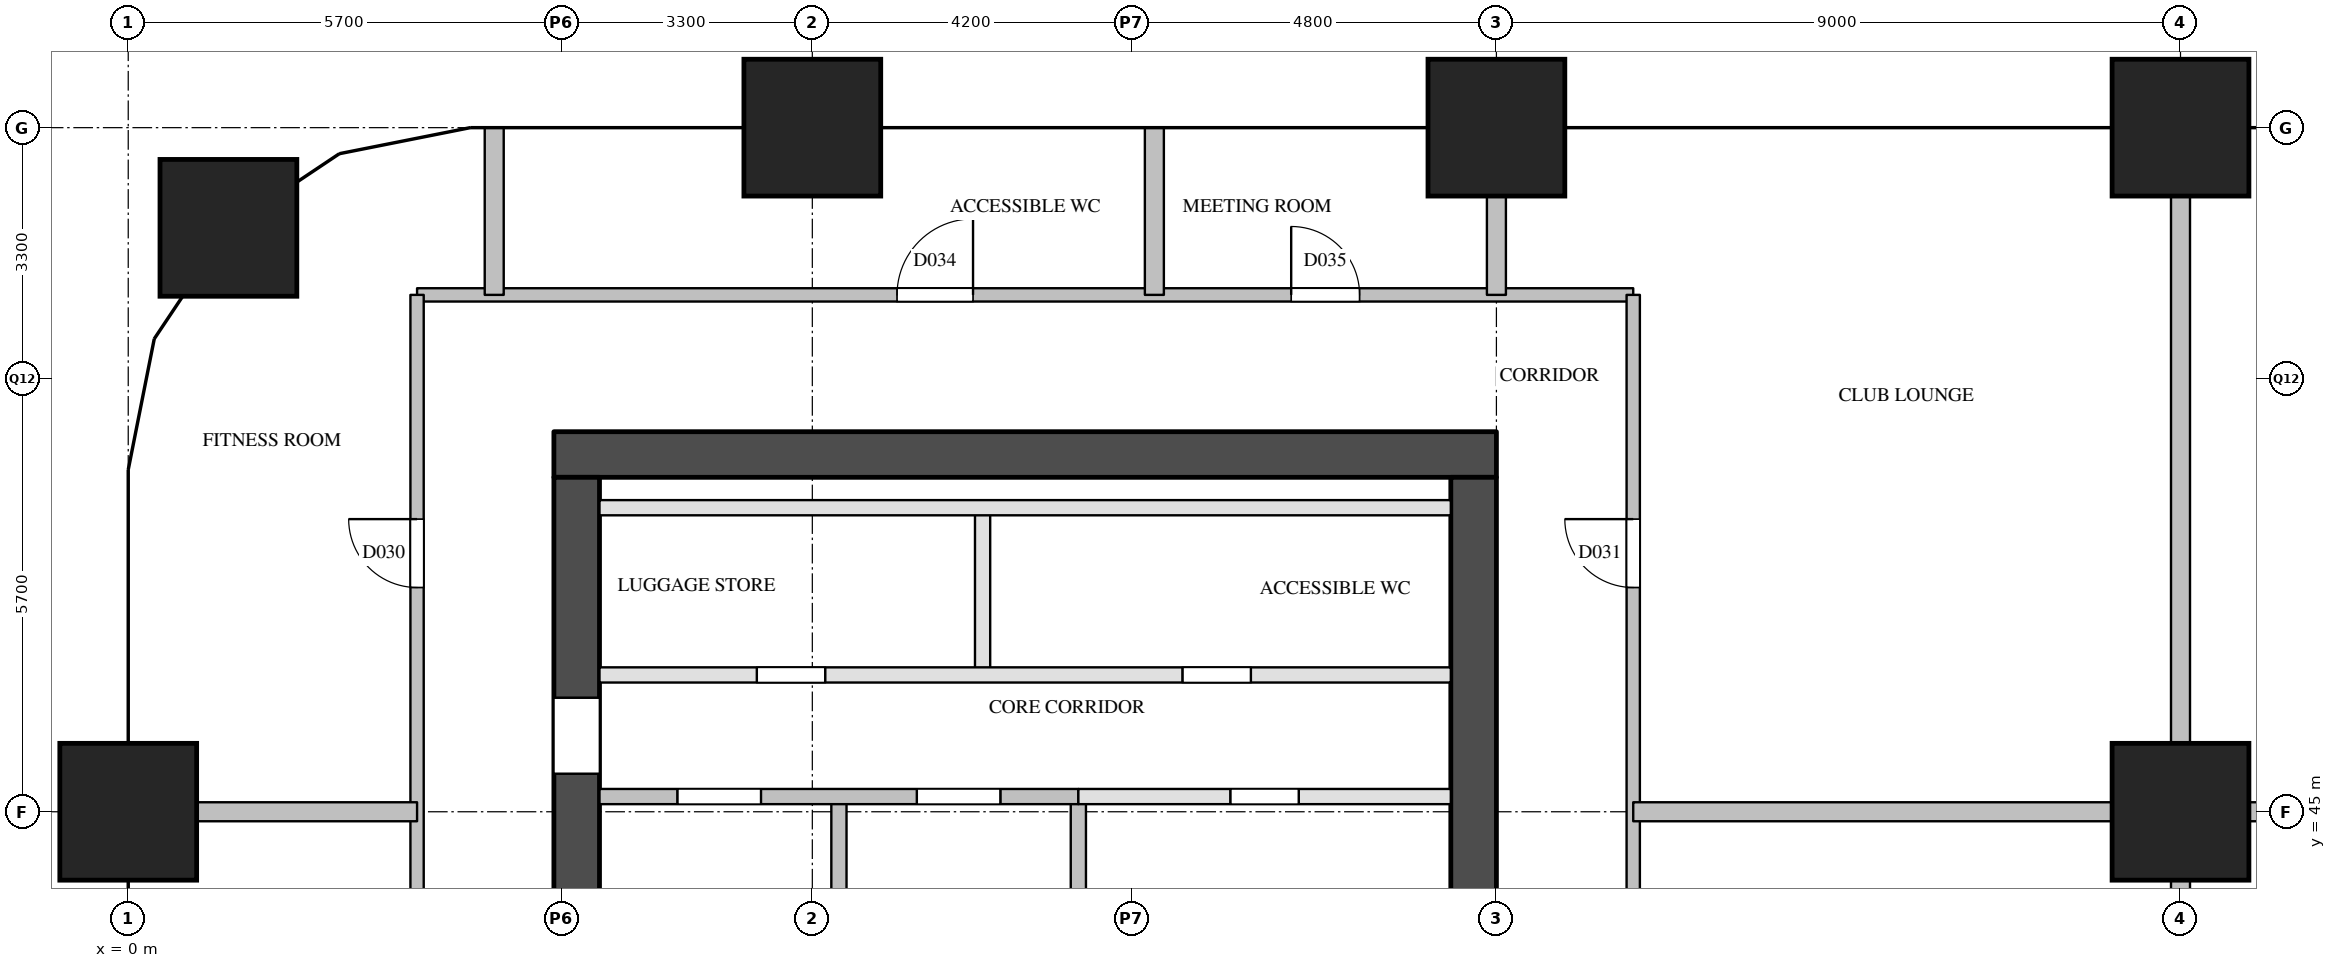
"""IFC4 building model, lengths in metres.
Left out: names, types, materials, properties, quantities, classifications, styles, units other than length and angle.
Written with IfcOpenShell. Run it as: python <this file> out.ifc"""

import sys

from ifc_helpers import new_model, si_unit, direction, frame, frame_2d, origin, origin_2d, place, context, subcontext, project, spatial, rectangle, extrude, element, fill, save


model = new_model("IFC4")
c1 = context("Model", 3, precision=1e-05, world=origin(), true_north=direction((0.0, 1.0)))
c2 = subcontext(c1, "Body", "Model", "MODEL_VIEW")
j1 = project(units=[si_unit("LENGTHUNIT", "METRE"), si_unit("PLANEANGLEUNIT", "RADIAN")], contexts=[c1])
p1 = place(None, origin())
s1 = spatial("IfcSite", under=j1, at=p1, CompositionType="ELEMENT")
p2 = place(p1, origin())
s2 = spatial("IfcBuilding", under=s1, at=p2, CompositionType="ELEMENT")
p3 = place(p2, frame((0.0, 0.0, 104.4)))
s3 = spatial("IfcBuildingStorey", under=s2, at=p3, CompositionType="ELEMENT", Elevation=104.4)
for number, where, z_axis, x_axis in (
    (1, (0.0, 45.0, 0.0), (0.0, 0.0, 1.0), (1.0, 0.0, 0.0)),
    (2, (1.318, 52.682, 0.0), (0.0, 0.0, 1.0), (1.0, 0.0, 0.0)),
    (3, (9.0, 54.0, 0.0), (0.0, 0.0, 1.0), (1.0, 0.0, 0.0)),
    (4, (18.0, 54.0, 0.0), (0.0, 0.0, 1.0), (1.0, 0.0, 0.0)),
    (5, (27.0, 45.0, 0.0), (0.0, 0.0, 1.0), (1.0, 0.0, 0.0)),
    (6, (27.0, 54.0, 0.0), (0.0, 0.0, 1.0), (1.0, 0.0, 0.0)),
):
    element("IfcColumn", number, at=place(p3, frame(where, z_axis=z_axis, x_axis=x_axis)), inside=s3, PredefinedType="COLUMN", context=c2, shape_type="SweptSolid", body=[
        extrude(rectangle(XDim=1.8, YDim=1.8, at=origin_2d()), origin(), (0.0, 0.0, 1.0), 3.8),
    ])
p4 = place(p3, frame((5.6, 49.7, 0.0), z_axis=(0.0, 0.0, 1.0), x_axis=(1.0, 0.0, 0.0)))
e7 = element("IfcWall", 7, at=p4, inside=s3, PredefinedType="SHEAR", context=c2, shape_type="SweptSolid", body=[
    extrude(rectangle(XDim=12.4, YDim=0.6, at=frame_2d((6.2, 0.0))), origin(), (0.0, 0.0, 1.0), 3.5),
])
p5 = place(p3, frame((5.9, 29.1, 0.0), z_axis=(0.0, 0.0, 1.0), x_axis=(0.0, 1.0, 0.0)))
e8 = element("IfcWall", 8, at=p5, inside=s3, PredefinedType="SHEAR", context=c2, shape_type="SweptSolid", body=[
    extrude(rectangle(XDim=20.3, YDim=0.6, at=frame_2d((10.15, 0.0))), origin(), (0.0, 0.0, 1.0), 3.5),
])
p6 = place(p5, frame((3.6, 0.0, 0.0)))
e9 = element("IfcOpeningElement", 9, at=p6, cuts=e8, PredefinedType="OPENING", context=c2, shape_type="SweptSolid", body=[
    extrude(rectangle(XDim=1.8, YDim=2.1, at=frame_2d((0.9, 1.05))), frame((0.0, 0.31, 0.0), z_axis=(0.0, -1.0, 0.0), x_axis=(1.0, 0.0, 0.0)), (0.0, 0.0, 1.0), 0.62),
])
p7 = place(p5, frame((16.4, 0.0, 0.0)))
e10 = element("IfcOpeningElement", 10, at=p7, cuts=e8, PredefinedType="OPENING", context=c2, shape_type="SweptSolid", body=[
    extrude(rectangle(XDim=1.0, YDim=2.1, at=frame_2d((0.5, 1.05))), frame((0.0, 0.31, 0.0), z_axis=(0.0, -1.0, 0.0), x_axis=(1.0, 0.0, 0.0)), (0.0, 0.0, 1.0), 0.62),
])
p8 = place(p3, frame((17.7, 29.1, 0.0), z_axis=(0.0, 0.0, 1.0), x_axis=(0.0, 1.0, 0.0)))
e11 = element("IfcWall", 11, at=p8, inside=s3, PredefinedType="SHEAR", context=c2, shape_type="SweptSolid", body=[
    extrude(rectangle(XDim=20.3, YDim=0.6, at=frame_2d((10.15, 0.0))), origin(), (0.0, 0.0, 1.0), 3.5),
])
p9 = place(p8, frame((1.25, 0.0, 0.0)))
e12 = element("IfcOpeningElement", 12, at=p9, cuts=e11, PredefinedType="OPENING", context=c2, shape_type="SweptSolid", body=[
    extrude(rectangle(XDim=0.7, YDim=2.1, at=frame_2d((0.35, 1.05))), frame((0.0, 0.31, 0.0), z_axis=(0.0, -1.0, 0.0), x_axis=(1.0, 0.0, 0.0)), (0.0, 0.0, 1.0), 0.62),
])
p10 = place(p8, frame((7.05, 0.0, 0.0)))
e13 = element("IfcOpeningElement", 13, at=p10, cuts=e11, PredefinedType="OPENING", context=c2, shape_type="SweptSolid", body=[
    extrude(rectangle(XDim=0.7, YDim=2.1, at=frame_2d((0.35, 1.05))), frame((0.0, 0.31, 0.0), z_axis=(0.0, -1.0, 0.0), x_axis=(1.0, 0.0, 0.0)), (0.0, 0.0, 1.0), 0.62),
])
p11 = place(p3, frame((9.35, 40.9, 0.0), z_axis=(0.0, 0.0, 1.0), x_axis=(0.0, 1.0, 0.0)))
e14 = element("IfcWall", 14, at=p11, inside=s3, PredefinedType="SOLIDWALL", context=c2, shape_type="SweptSolid", body=[
    extrude(rectangle(XDim=4.3, YDim=0.2, at=frame_2d((2.15, 0.0))), origin(), (0.0, 0.0, 1.0), 3.5),
])
p12 = place(p3, frame((11.24, 46.8, 0.0), z_axis=(0.0, 0.0, 1.0), x_axis=(0.0, 1.0, 0.0)))
e15 = element("IfcWall", 15, at=p12, inside=s3, PredefinedType="PARTITIONING", context=c2, shape_type="SweptSolid", body=[
    extrude(rectangle(XDim=2.2, YDim=0.2, at=frame_2d((1.1, 0.0))), origin(), (0.0, 0.0, 1.0), 3.5),
])
p13 = place(p3, frame((12.5, 40.9, 0.0), z_axis=(0.0, 0.0, 1.0), x_axis=(0.0, 1.0, 0.0)))
e16 = element("IfcWall", 16, at=p13, inside=s3, PredefinedType="SOLIDWALL", context=c2, shape_type="SweptSolid", body=[
    extrude(rectangle(XDim=4.3, YDim=0.2, at=frame_2d((2.15, 0.0))), origin(), (0.0, 0.0, 1.0), 3.5),
])
p14 = place(p3, frame((12.5, 45.2, 0.0), z_axis=(0.0, 0.0, 1.0), x_axis=(1.0, 0.0, 0.0)))
e17 = element("IfcWall", 17, at=p14, inside=s3, PredefinedType="PARTITIONING", context=c2, shape_type="SweptSolid", body=[
    extrude(rectangle(XDim=4.9, YDim=0.2, at=frame_2d((2.45, 0.0))), origin(), (0.0, 0.0, 1.0), 3.5),
])
p15 = place(p14, frame((2.0, 0.0, 0.0)))
e18 = element("IfcOpeningElement", 18, at=p15, cuts=e17, PredefinedType="OPENING", context=c2, shape_type="SweptSolid", body=[
    extrude(rectangle(XDim=0.9, YDim=2.1, at=frame_2d((0.45, 1.05))), frame((0.0, 0.11, 0.0), z_axis=(0.0, -1.0, 0.0), x_axis=(1.0, 0.0, 0.0)), (0.0, 0.0, 1.0), 0.22),
])
p16 = place(p3, frame((6.2, 45.2, 0.0), z_axis=(0.0, 0.0, 1.0), x_axis=(1.0, 0.0, 0.0)))
e19 = element("IfcWall", 19, at=p16, inside=s3, PredefinedType="SOLIDWALL", context=c2, shape_type="SweptSolid", body=[
    extrude(rectangle(XDim=6.3, YDim=0.2, at=frame_2d((3.15, 0.0))), origin(), (0.0, 0.0, 1.0), 3.5),
])
p17 = place(p16, frame((1.025, 0.0, 0.0)))
e20 = element("IfcOpeningElement", 20, at=p17, cuts=e19, PredefinedType="OPENING", context=c2, shape_type="SweptSolid", body=[
    extrude(rectangle(XDim=1.1, YDim=2.1, at=frame_2d((0.55, 1.05))), frame((0.0, 0.11, 0.0), z_axis=(0.0, -1.0, 0.0), x_axis=(1.0, 0.0, 0.0)), (0.0, 0.0, 1.0), 0.22),
])
p18 = place(p16, frame((4.175, 0.0, 0.0)))
e21 = element("IfcOpeningElement", 21, at=p18, cuts=e19, PredefinedType="OPENING", context=c2, shape_type="SweptSolid", body=[
    extrude(rectangle(XDim=1.1, YDim=2.1, at=frame_2d((0.55, 1.05))), frame((0.0, 0.11, 0.0), z_axis=(0.0, -1.0, 0.0), x_axis=(1.0, 0.0, 0.0)), (0.0, 0.0, 1.0), 0.22),
])
p19 = place(p3, frame((6.2, 46.8, 0.0), z_axis=(0.0, 0.0, 1.0), x_axis=(1.0, 0.0, 0.0)))
e22 = element("IfcWall", 22, at=p19, inside=s3, PredefinedType="PARTITIONING", context=c2, shape_type="SweptSolid", body=[
    extrude(rectangle(XDim=11.2, YDim=0.2, at=frame_2d((5.6, 0.0))), origin(), (0.0, 0.0, 1.0), 3.5),
])
p20 = place(p19, frame((2.07, 0.0, 0.0)))
e23 = element("IfcOpeningElement", 23, at=p20, cuts=e22, PredefinedType="OPENING", context=c2, shape_type="SweptSolid", body=[
    extrude(rectangle(XDim=0.9, YDim=2.1, at=frame_2d((0.45, 1.05))), frame((0.0, 0.11, 0.0), z_axis=(0.0, -1.0, 0.0), x_axis=(1.0, 0.0, 0.0)), (0.0, 0.0, 1.0), 0.22),
])
p21 = place(p19, frame((7.67, 0.0, 0.0)))
e24 = element("IfcOpeningElement", 24, at=p21, cuts=e22, PredefinedType="OPENING", context=c2, shape_type="SweptSolid", body=[
    extrude(rectangle(XDim=0.9, YDim=2.1, at=frame_2d((0.45, 1.05))), frame((0.0, 0.11, 0.0), z_axis=(0.0, -1.0, 0.0), x_axis=(1.0, 0.0, 0.0)), (0.0, 0.0, 1.0), 0.22),
])
p22 = place(p3, frame((6.2, 49.0, 0.0), z_axis=(0.0, 0.0, 1.0), x_axis=(1.0, 0.0, 0.0)))
e25 = element("IfcWall", 25, at=p22, inside=s3, PredefinedType="PARTITIONING", context=c2, shape_type="SweptSolid", body=[
    extrude(rectangle(XDim=11.2, YDim=0.2, at=frame_2d((5.6, 0.0))), origin(), (0.0, 0.0, 1.0), 3.5),
])
p23 = place(p3, frame((3.8, 51.8, 0.0), z_axis=(0.0, 0.0, 1.0), x_axis=(1.0, 0.0, 0.0)))
e26 = element("IfcWall", 26, at=p23, inside=s3, PredefinedType="PARTITIONING", context=c2, shape_type="SweptSolid", body=[
    extrude(rectangle(XDim=16.0, YDim=0.175, at=frame_2d((8.0, 0.0))), origin(), (0.0, 0.0, 1.0), 3.5),
])
p24 = place(p23, frame((6.314, 0.0, 0.0)))
e27 = element("IfcOpeningElement", 27, at=p24, cuts=e26, PredefinedType="OPENING", context=c2, shape_type="SweptSolid", body=[
    extrude(rectangle(XDim=1.0, YDim=2.1, at=frame_2d((0.5, 1.05))), frame((0.0, 0.097, 0.0), z_axis=(0.0, -1.0, 0.0), x_axis=(1.0, 0.0, 0.0)), (0.0, 0.0, 1.0), 0.195),
])
p25 = place(p23, frame((11.5, 0.0, 0.0)))
e28 = element("IfcOpeningElement", 28, at=p25, cuts=e26, PredefinedType="OPENING", context=c2, shape_type="SweptSolid", body=[
    extrude(rectangle(XDim=0.9, YDim=2.1, at=frame_2d((0.45, 1.05))), frame((0.0, 0.097, 0.0), z_axis=(0.0, -1.0, 0.0), x_axis=(1.0, 0.0, 0.0)), (0.0, 0.0, 1.0), 0.195),
])
p26 = place(p3, frame((3.8, 28.5, 0.0), z_axis=(0.0, 0.0, 1.0), x_axis=(0.0, 1.0, 0.0)))
e29 = element("IfcWall", 29, at=p26, inside=s3, PredefinedType="PARTITIONING", context=c2, shape_type="SweptSolid", body=[
    extrude(rectangle(XDim=23.3, YDim=0.175, at=frame_2d((11.65, 0.0))), origin(), (0.0, 0.0, 1.0), 3.5),
])
p27 = place(p26, frame((3.3, 0.0, 0.0)))
e30 = element("IfcOpeningElement", 30, at=p27, cuts=e29, PredefinedType="OPENING", context=c2, shape_type="SweptSolid", body=[
    extrude(rectangle(XDim=0.9, YDim=2.1, at=frame_2d((0.45, 1.05))), frame((0.0, 0.097, 0.0), z_axis=(0.0, -1.0, 0.0), x_axis=(1.0, 0.0, 0.0)), (0.0, 0.0, 1.0), 0.195),
])
p28 = place(p26, frame((11.55, 0.0, 0.0)))
e31 = element("IfcOpeningElement", 31, at=p28, cuts=e29, PredefinedType="OPENING", context=c2, shape_type="SweptSolid", body=[
    extrude(rectangle(XDim=0.9, YDim=2.1, at=frame_2d((0.45, 1.05))), frame((0.0, 0.097, 0.0), z_axis=(0.0, -1.0, 0.0), x_axis=(1.0, 0.0, 0.0)), (0.0, 0.0, 1.0), 0.195),
])
p29 = place(p26, frame((19.45, 0.0, 0.0)))
e32 = element("IfcOpeningElement", 32, at=p29, cuts=e29, PredefinedType="OPENING", context=c2, shape_type="SweptSolid", body=[
    extrude(rectangle(XDim=0.9, YDim=2.1, at=frame_2d((0.45, 1.05))), frame((0.0, 0.097, 0.0), z_axis=(0.0, -1.0, 0.0), x_axis=(1.0, 0.0, 0.0)), (0.0, 0.0, 1.0), 0.195),
])
p30 = place(p3, frame((19.8, 28.5, 0.0), z_axis=(0.0, 0.0, 1.0), x_axis=(0.0, 1.0, 0.0)))
e33 = element("IfcWall", 33, at=p30, inside=s3, PredefinedType="PARTITIONING", context=c2, shape_type="SweptSolid", body=[
    extrude(rectangle(XDim=23.3, YDim=0.175, at=frame_2d((11.65, 0.0))), origin(), (0.0, 0.0, 1.0), 3.5),
])
p31 = place(p30, frame((3.3, 0.0, 0.0)))
e34 = element("IfcOpeningElement", 34, at=p31, cuts=e33, PredefinedType="OPENING", context=c2, shape_type="SweptSolid", body=[
    extrude(rectangle(XDim=0.9, YDim=2.1, at=frame_2d((0.45, 1.05))), frame((0.0, 0.097, 0.0), z_axis=(0.0, -1.0, 0.0), x_axis=(1.0, 0.0, 0.0)), (0.0, 0.0, 1.0), 0.195),
])
p32 = place(p30, frame((11.5, 0.0, 0.0)))
e35 = element("IfcOpeningElement", 35, at=p32, cuts=e33, PredefinedType="OPENING", context=c2, shape_type="SweptSolid", body=[
    extrude(rectangle(XDim=1.0, YDim=2.1, at=frame_2d((0.5, 1.05))), frame((0.0, 0.097, 0.0), z_axis=(0.0, -1.0, 0.0), x_axis=(1.0, 0.0, 0.0)), (0.0, 0.0, 1.0), 0.195),
])
p33 = place(p30, frame((19.45, 0.0, 0.0)))
e36 = element("IfcOpeningElement", 36, at=p33, cuts=e33, PredefinedType="OPENING", context=c2, shape_type="SweptSolid", body=[
    extrude(rectangle(XDim=0.9, YDim=2.1, at=frame_2d((0.45, 1.05))), frame((0.0, 0.097, 0.0), z_axis=(0.0, -1.0, 0.0), x_axis=(1.0, 0.0, 0.0)), (0.0, 0.0, 1.0), 0.195),
])
p34 = place(p3, frame((0.0, 45.0, 0.0), z_axis=(0.0, 0.0, 1.0), x_axis=(1.0, 0.0, 0.0)))
e37 = element("IfcWall", 37, at=p34, inside=s3, PredefinedType="PARTITIONING", context=c2, shape_type="SweptSolid", body=[
    extrude(rectangle(XDim=3.8, YDim=0.25, at=frame_2d((1.9, 0.0))), origin(), (0.0, 0.0, 1.0), 3.5),
])
p35 = place(p3, frame((19.8, 45.0, 0.0), z_axis=(0.0, 0.0, 1.0), x_axis=(1.0, 0.0, 0.0)))
e38 = element("IfcWall", 38, at=p35, inside=s3, PredefinedType="PARTITIONING", context=c2, shape_type="SweptSolid", body=[
    extrude(rectangle(XDim=14.4, YDim=0.25, at=frame_2d((7.2, 0.0))), origin(), (0.0, 0.0, 1.0), 3.5),
])
for number, where, z_axis, x_axis in (
    (39, (4.815, 51.8, 0.0), (0.0, 0.0, 1.0), (0.0, 1.0, 0.0)),
    (40, (13.5, 51.8, 0.0), (0.0, 0.0, 1.0), (0.0, 1.0, 0.0)),
):
    element("IfcWall", number, at=place(p3, frame(where, z_axis=z_axis, x_axis=x_axis)), inside=s3, PredefinedType="PARTITIONING", context=c2, shape_type="SweptSolid", body=[
        extrude(rectangle(XDim=2.2, YDim=0.25, at=frame_2d((1.1, 0.0))), origin(), (0.0, 0.0, 1.0), 2.5),
    ])
p36 = place(p3, frame((18.0, 51.8, 0.0), z_axis=(0.0, 0.0, 1.0), x_axis=(0.0, 1.0, 0.0)))
e41 = element("IfcWall", 41, at=p36, inside=s3, PredefinedType="PARTITIONING", context=c2, shape_type="SweptSolid", body=[
    extrude(rectangle(XDim=2.2, YDim=0.25, at=frame_2d((1.1, 0.0))), origin(), (0.0, 0.0, 1.0), 3.5),
])
p37 = place(p3, frame((27.0, 36.0, 0.0), z_axis=(0.0, 0.0, 1.0), x_axis=(0.0, 1.0, 0.0)))
e42 = element("IfcWall", 42, at=p37, inside=s3, PredefinedType="PARTITIONING", context=c2, shape_type="SweptSolid", body=[
    extrude(rectangle(XDim=18.0, YDim=0.25, at=frame_2d((9.0, 0.0))), origin(), (0.0, 0.0, 1.0), 2.5),
])
p38 = place(p17, origin())
e43 = element("IfcDoor", 43, at=p38, inside=s3, OperationType="SINGLE_SWING_LEFT", PredefinedType="DOOR", context=c2, shape_type="SweptSolid", body=[
    extrude(rectangle(XDim=1.1, YDim=2.1, at=frame_2d((0.55, 1.05))), frame((0.0, 0.025, 0.0), z_axis=(0.0, -1.0, 0.0), x_axis=(1.0, 0.0, 0.0)), (0.0, 0.0, 1.0), 0.05),
])
fill(e20, e43)
p39 = place(p18, origin())
e44 = element("IfcDoor", 44, at=p39, inside=s3, OperationType="SINGLE_SWING_RIGHT", PredefinedType="DOOR", context=c2, shape_type="SweptSolid", body=[
    extrude(rectangle(XDim=1.1, YDim=2.1, at=frame_2d((0.55, 1.05))), frame((0.0, 0.025, 0.0), z_axis=(0.0, -1.0, 0.0), x_axis=(1.0, 0.0, 0.0)), (0.0, 0.0, 1.0), 0.05),
])
fill(e21, e44)
p40 = place(p7, origin())
e45 = element("IfcDoor", 45, at=p40, inside=s3, OperationType="SINGLE_SWING_RIGHT", PredefinedType="DOOR", context=c2, shape_type="SweptSolid", body=[
    extrude(rectangle(XDim=1.0, YDim=2.1, at=frame_2d((0.5, 1.05))), frame((0.0, 0.025, 0.0), z_axis=(0.0, -1.0, 0.0), x_axis=(1.0, 0.0, 0.0)), (0.0, 0.0, 1.0), 0.05),
])
fill(e10, e45)
p41 = place(p20, origin())
e46 = element("IfcDoor", 46, at=p41, inside=s3, OperationType="SINGLE_SWING_LEFT", PredefinedType="DOOR", context=c2, shape_type="SweptSolid", body=[
    extrude(rectangle(XDim=0.9, YDim=2.1, at=frame_2d((0.45, 1.05))), frame((0.0, 0.025, 0.0), z_axis=(0.0, -1.0, 0.0), x_axis=(1.0, 0.0, 0.0)), (0.0, 0.0, 1.0), 0.05),
])
fill(e23, e46)
p42 = place(p21, origin())
e47 = element("IfcDoor", 47, at=p42, inside=s3, OperationType="SINGLE_SWING_RIGHT", PredefinedType="DOOR", context=c2, shape_type="SweptSolid", body=[
    extrude(rectangle(XDim=0.9, YDim=2.1, at=frame_2d((0.45, 1.05))), frame((0.0, 0.025, 0.0), z_axis=(0.0, -1.0, 0.0), x_axis=(1.0, 0.0, 0.0)), (0.0, 0.0, 1.0), 0.05),
])
fill(e24, e47)
p43 = place(p15, origin())
e48 = element("IfcDoor", 48, at=p43, inside=s3, OperationType="SINGLE_SWING_RIGHT", PredefinedType="DOOR", context=c2, shape_type="SweptSolid", body=[
    extrude(rectangle(XDim=0.9, YDim=2.1, at=frame_2d((0.45, 1.05))), frame((0.0, 0.025, 0.0), z_axis=(0.0, -1.0, 0.0), x_axis=(1.0, 0.0, 0.0)), (0.0, 0.0, 1.0), 0.05),
])
fill(e18, e48)
p44 = place(p29, origin())
e49 = element("IfcDoor", 49, at=p44, inside=s3, OperationType="SINGLE_SWING_RIGHT", PredefinedType="DOOR", context=c2, shape_type="SweptSolid", body=[
    extrude(rectangle(XDim=0.9, YDim=2.1, at=frame_2d((0.45, 1.05))), frame((0.0, 0.025, 0.0), z_axis=(0.0, -1.0, 0.0), x_axis=(1.0, 0.0, 0.0)), (0.0, 0.0, 1.0), 0.05),
])
fill(e32, e49)
p45 = place(p33, origin())
e50 = element("IfcDoor", 50, at=p45, inside=s3, OperationType="SINGLE_SWING_RIGHT", PredefinedType="DOOR", context=c2, shape_type="SweptSolid", body=[
    extrude(rectangle(XDim=0.9, YDim=2.1, at=frame_2d((0.45, 1.05))), frame((0.0, 0.025, 0.0), z_axis=(0.0, -1.0, 0.0), x_axis=(1.0, 0.0, 0.0)), (0.0, 0.0, 1.0), 0.05),
])
fill(e36, e50)
p46 = place(p24, origin())
e51 = element("IfcDoor", 51, at=p46, inside=s3, OperationType="SINGLE_SWING_RIGHT", PredefinedType="DOOR", context=c2, shape_type="SweptSolid", body=[
    extrude(rectangle(XDim=1.0, YDim=2.1, at=frame_2d((0.5, 1.05))), frame((0.0, 0.025, 0.0), z_axis=(0.0, -1.0, 0.0), x_axis=(1.0, 0.0, 0.0)), (0.0, 0.0, 1.0), 0.05),
])
fill(e27, e51)
p47 = place(p25, origin())
e52 = element("IfcDoor", 52, at=p47, inside=s3, OperationType="SINGLE_SWING_LEFT", PredefinedType="DOOR", context=c2, shape_type="SweptSolid", body=[
    extrude(rectangle(XDim=0.9, YDim=2.1, at=frame_2d((0.45, 1.05))), frame((0.0, 0.025, 0.0), z_axis=(0.0, -1.0, 0.0), x_axis=(1.0, 0.0, 0.0)), (0.0, 0.0, 1.0), 0.05),
])
fill(e28, e52)
save(model, sys.argv[1])
